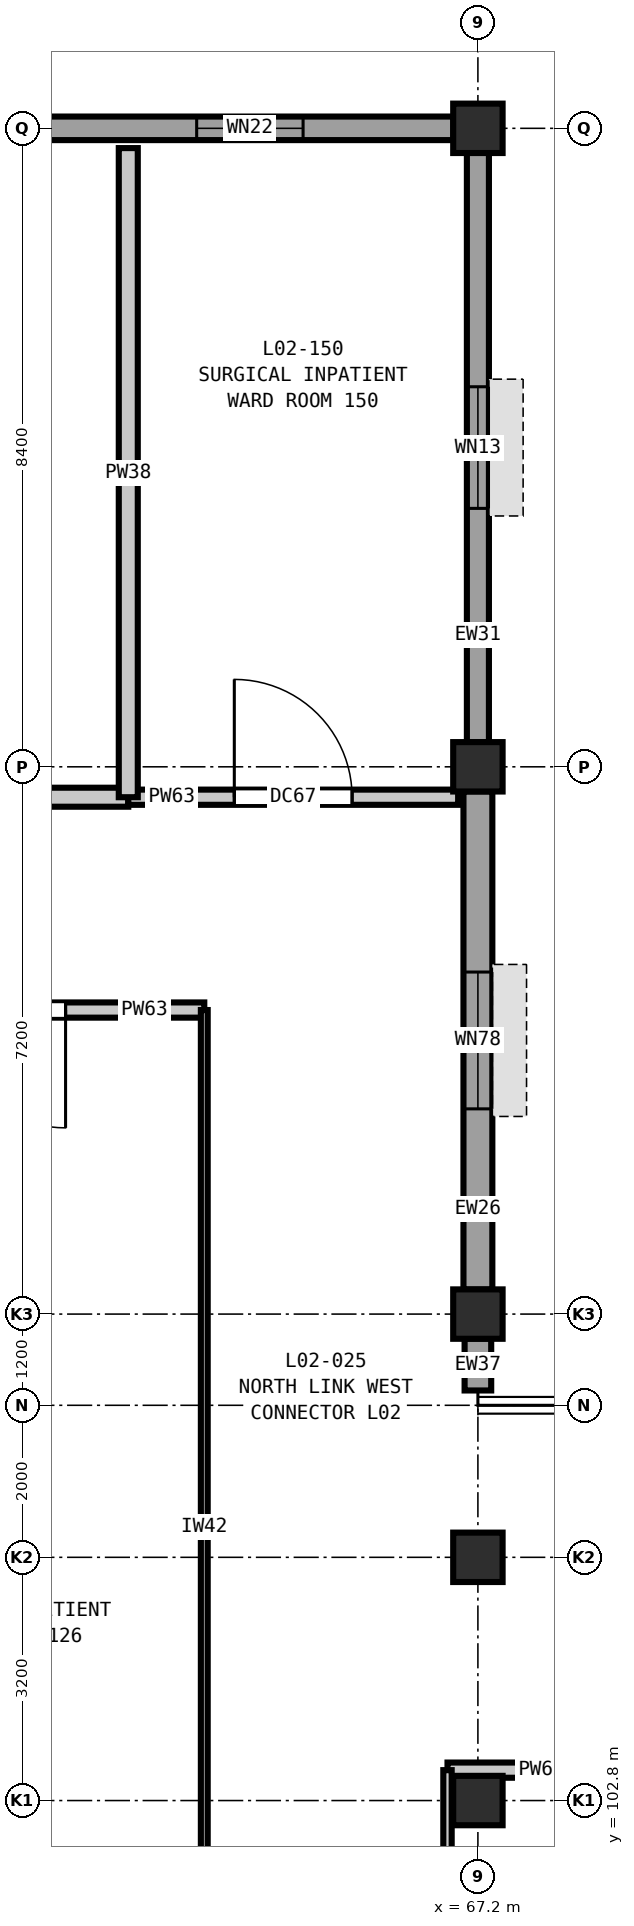
"""IFC4 building model, lengths in metres.
Left out: names, types, materials, properties, quantities, classifications, styles, units other than length and angle.
Written with IfcOpenShell. Run it as: python <this file> out.ifc"""

import sys

from ifc_helpers import new_model, si_unit, direction, frame, frame_2d, origin, origin_2d, place, context, subcontext, project, spatial, rectangle, extrude, element, fill, save


model = new_model("IFC4")
c1 = context("Model", 3, precision=1e-05, world=origin(), true_north=direction((0.0, 1.0)))
c2 = subcontext(c1, "Body", "Model", "MODEL_VIEW")
j1 = project(units=[si_unit("LENGTHUNIT", "METRE"), si_unit("PLANEANGLEUNIT", "RADIAN")], contexts=[c1])
p1 = place(None, origin())
s1 = spatial("IfcSite", under=j1, at=p1, CompositionType="ELEMENT")
p2 = place(p1, origin())
s2 = spatial("IfcBuilding", under=s1, at=p2, CompositionType="ELEMENT")
p3 = place(p2, frame((0.0, 0.0, 10.8)))
s3 = spatial("IfcBuildingStorey", under=s2, at=p3, CompositionType="ELEMENT", Elevation=10.8)
for number, where, z_axis, x_axis in (
    (1, (67.2, 102.8, 0.0), (0.0, 0.0, 1.0), (1.0, 0.0, 0.0)),
    (2, (67.2, 106.0, 0.0), (0.0, 0.0, 1.0), (1.0, 0.0, 0.0)),
    (3, (67.2, 109.2, 0.0), (0.0, 0.0, 1.0), (1.0, 0.0, 0.0)),
    (4, (67.2, 116.4, 0.0), (0.0, 0.0, 1.0), (1.0, 0.0, 0.0)),
    (5, (67.2, 124.8, 0.0), (0.0, 0.0, 1.0), (1.0, 0.0, 0.0)),
):
    element("IfcColumn", number, at=place(p3, frame(where, z_axis=z_axis, x_axis=x_axis)), inside=s3, PredefinedType="COLUMN", context=c2, shape_type="SweptSolid", body=[
        extrude(rectangle(XDim=0.65, YDim=0.65, at=origin_2d()), origin(), (0.0, 0.0, 1.0), 5.4),
    ])
p4 = place(p3, frame((59.123, 124.8, 0.0), z_axis=(0.0, 0.0, 1.0), x_axis=(1.0, 0.0, 0.0)))
e6 = element("IfcWall", 6, at=p4, inside=s3, PredefinedType="SOLIDWALL", context=c2, shape_type="SweptSolid", body=[
    extrude(rectangle(XDim=7.754, YDim=0.31, at=frame_2d((3.877, 0.0))), origin(), (0.0, 0.0, 1.0), 4.68),
])
p5 = place(p4, frame((4.377, 0.0, 0.9)))
e7 = element("IfcOpeningElement", 7, at=p5, cuts=e6, PredefinedType="OPENING", context=c2, shape_type="SweptSolid", body=[
    extrude(rectangle(XDim=1.4, YDim=1.95, at=frame_2d((0.7, 0.975))), frame((0.0, 0.165, 0.0), z_axis=(0.0, -1.0, 0.0), x_axis=(1.0, 0.0, 0.0)), (0.0, 0.0, 1.0), 0.33),
])
p6 = place(p3, frame((67.2, 124.477, 0.0), z_axis=(0.0, 0.0, 1.0), x_axis=(0.0, -1.0, 0.0)))
e8 = element("IfcWall", 8, at=p6, inside=s3, PredefinedType="SOLIDWALL", context=c2, shape_type="SweptSolid", body=[
    extrude(rectangle(XDim=7.754, YDim=0.29, at=frame_2d((3.877, 0.0))), origin(), (0.0, 0.0, 1.0), 4.68),
])
p7 = place(p6, frame((3.077, 0.0, 0.9)))
e9 = element("IfcOpeningElement", 9, at=p7, cuts=e8, PredefinedType="OPENING", context=c2, shape_type="SweptSolid", body=[
    extrude(rectangle(XDim=1.6, YDim=1.95, at=frame_2d((0.8, 0.975))), frame((0.0, 0.155, 0.0), z_axis=(0.0, -1.0, 0.0), x_axis=(1.0, 0.0, 0.0)), (0.0, 0.0, 1.0), 0.31),
])
p8 = place(p3, frame((67.2, 116.077, 0.0), z_axis=(0.0, 0.0, 1.0), x_axis=(0.0, -1.0, 0.0)))
e10 = element("IfcWall", 10, at=p8, inside=s3, PredefinedType="SOLIDWALL", context=c2, shape_type="SweptSolid", body=[
    extrude(rectangle(XDim=6.554, YDim=0.38, at=frame_2d((3.277, 0.0))), origin(), (0.0, 0.0, 1.0), 4.68),
])
p9 = place(p8, frame((2.377, 0.0, 0.9)))
e11 = element("IfcOpeningElement", 11, at=p9, cuts=e10, PredefinedType="OPENING", context=c2, shape_type="SweptSolid", body=[
    extrude(rectangle(XDim=1.8, YDim=1.95, at=frame_2d((0.9, 0.975))), frame((0.0, 0.2, 0.0), z_axis=(0.0, -1.0, 0.0), x_axis=(1.0, 0.0, 0.0)), (0.0, 0.0, 1.0), 0.4),
])
p10 = place(p3, frame((67.2, 108.877, 0.0), z_axis=(0.0, 0.0, 1.0), x_axis=(0.0, -1.0, 0.0)))
e12 = element("IfcWall", 12, at=p10, inside=s3, PredefinedType="SOLIDWALL", context=c2, shape_type="SweptSolid", body=[
    extrude(rectangle(XDim=0.682, YDim=0.35, at=frame_2d((0.341, 0.0))), origin(), (0.0, 0.0, 1.0), 4.68),
])
p11 = place(p3, frame((66.8, 103.2, 0.0), z_axis=(0.0, 0.0, 1.0), x_axis=(1.0, 0.0, 0.0)))
e13 = element("IfcWall", 13, at=p11, inside=s3, PredefinedType="PARTITIONING", context=c2, shape_type="SweptSolid", body=[
    extrude(rectangle(XDim=6.8, YDim=0.2, at=frame_2d((3.4, 0.0))), origin(), (0.0, 0.0, 1.0), 5.07),
])
p12 = place(p11, frame((2.725, 0.0, 0.0)))
e14 = element("IfcOpeningElement", 14, at=p12, cuts=e13, PredefinedType="OPENING", context=c2, shape_type="SweptSolid", body=[
    extrude(rectangle(XDim=1.35, YDim=2.2, at=frame_2d((0.675, 1.1))), frame((0.0, 0.11, 0.0), z_axis=(0.0, -1.0, 0.0), x_axis=(1.0, 0.0, 0.0)), (0.0, 0.0, 1.0), 0.22),
])
p13 = place(p3, frame((58.4, 113.2, 0.0), z_axis=(0.0, 0.0, 1.0), x_axis=(1.0, 0.0, 0.0)))
e15 = element("IfcWall", 15, at=p13, inside=s3, PredefinedType="PARTITIONING", context=c2, shape_type="SweptSolid", body=[
    extrude(rectangle(XDim=5.2, YDim=0.2, at=frame_2d((2.6, 0.0))), origin(), (0.0, 0.0, 1.0), 5.07),
])
p14 = place(p13, frame((1.825, 0.0, 0.0)))
e16 = element("IfcOpeningElement", 16, at=p14, cuts=e15, PredefinedType="OPENING", context=c2, shape_type="SweptSolid", body=[
    extrude(rectangle(XDim=1.55, YDim=2.25, at=frame_2d((0.775, 1.125))), frame((0.0, 0.11, 0.0), z_axis=(0.0, -1.0, 0.0), x_axis=(1.0, 0.0, 0.0)), (0.0, 0.0, 1.0), 0.22),
])
p15 = place(p3, frame((57.2, 116.0, 0.0), z_axis=(0.0, 0.0, 1.0), x_axis=(1.0, 0.0, 0.0)))
e17 = element("IfcWall", 17, at=p15, inside=s3, PredefinedType="PARTITIONING", context=c2, shape_type="SweptSolid", body=[
    extrude(rectangle(XDim=5.4, YDim=0.25, at=frame_2d((2.7, 0.0))), origin(), (0.0, 0.0, 1.0), 5.07),
])
p16 = place(p15, frame((2.6, 0.0, 0.0)))
e18 = element("IfcOpeningElement", 18, at=p16, cuts=e17, PredefinedType="OPENING", context=c2, shape_type="SweptSolid", body=[
    extrude(rectangle(XDim=1.45, YDim=2.25, at=frame_2d((0.725, 1.125))), frame((0.0, 0.135, 0.0), z_axis=(0.0, -1.0, 0.0), x_axis=(1.0, 0.0, 0.0)), (0.0, 0.0, 1.0), 0.27),
])
p17 = place(p3, frame((62.6, 116.0, 0.0), z_axis=(0.0, 0.0, 1.0), x_axis=(1.0, 0.0, 0.0)))
e19 = element("IfcWall", 19, at=p17, inside=s3, PredefinedType="PARTITIONING", context=c2, shape_type="SweptSolid", body=[
    extrude(rectangle(XDim=4.34, YDim=0.2, at=frame_2d((2.17, 0.0))), origin(), (0.0, 0.0, 1.0), 5.07),
])
p18 = place(p17, frame((1.395, 0.0, 0.0)))
e20 = element("IfcOpeningElement", 20, at=p18, cuts=e19, PredefinedType="OPENING", context=c2, shape_type="SweptSolid", body=[
    extrude(rectangle(XDim=1.55, YDim=2.25, at=frame_2d((0.775, 1.125))), frame((0.0, 0.11, 0.0), z_axis=(0.0, -1.0, 0.0), x_axis=(1.0, 0.0, 0.0)), (0.0, 0.0, 1.0), 0.22),
])
p19 = place(p3, frame((62.6, 116.0, 0.0), z_axis=(0.0, 0.0, 1.0), x_axis=(0.0, 1.0, 0.0)))
e21 = element("IfcWall", 21, at=p19, inside=s3, PredefinedType="PARTITIONING", context=c2, shape_type="SweptSolid", body=[
    extrude(rectangle(XDim=8.54, YDim=0.25, at=frame_2d((4.27, 0.0))), origin(), (0.0, 0.0, 1.0), 5.07),
])
p20 = place(p3, frame((63.6, 99.6, 0.0), z_axis=(0.0, 0.0, 1.0), x_axis=(0.0, 1.0, 0.0)))
e22 = element("IfcWall", 22, at=p20, inside=s3, PredefinedType="PARTITIONING", context=c2, shape_type="SweptSolid", body=[
    extrude(rectangle(XDim=13.6, YDim=0.09, at=frame_2d((6.8, 0.0))), origin(), (0.0, 0.0, 1.0), 5.07),
])
p21 = place(p3, frame((66.8, 99.6, 0.0), z_axis=(0.0, 0.0, 1.0), x_axis=(0.0, 1.0, 0.0)))
e23 = element("IfcWall", 23, at=p21, inside=s3, PredefinedType="PARTITIONING", context=c2, shape_type="SweptSolid", body=[
    extrude(rectangle(XDim=3.6, YDim=0.11, at=frame_2d((1.8, 0.0))), origin(), (0.0, 0.0, 1.0), 5.07),
])
p22 = place(p5, origin())
e24 = element("IfcWindow", 24, at=p22, inside=s3, PartitioningType="SINGLE_PANEL", PredefinedType="WINDOW", context=c2, shape_type="SweptSolid", body=[
    extrude(rectangle(XDim=1.4, YDim=1.95, at=frame_2d((0.7, 0.975))), frame((0.0, 0.03, 0.0), z_axis=(0.0, -1.0, 0.0), x_axis=(1.0, 0.0, 0.0)), (0.0, 0.0, 1.0), 0.06),
])
fill(e7, e24)
p23 = place(p7, origin())
e25 = element("IfcWindow", 25, at=p23, inside=s3, PartitioningType="DOUBLE_PANEL_VERTICAL", PredefinedType="WINDOW", context=c2, shape_type="SweptSolid", body=[
    extrude(rectangle(XDim=1.6, YDim=1.95, at=frame_2d((0.8, 0.975))), frame((0.0, 0.03, 0.0), z_axis=(0.0, -1.0, 0.0), x_axis=(1.0, 0.0, 0.0)), (0.0, 0.0, 1.0), 0.06),
])
fill(e9, e25)
p24 = place(p9, origin())
e26 = element("IfcWindow", 26, at=p24, inside=s3, PartitioningType="DOUBLE_PANEL_VERTICAL", PredefinedType="WINDOW", context=c2, shape_type="SweptSolid", body=[
    extrude(rectangle(XDim=1.8, YDim=1.95, at=frame_2d((0.9, 0.975))), frame((0.0, 0.03, 0.0), z_axis=(0.0, -1.0, 0.0), x_axis=(1.0, 0.0, 0.0)), (0.0, 0.0, 1.0), 0.06),
])
fill(e11, e26)
p25 = place(p14, frame((1.55, 0.0, 0.0), z_axis=(0.0, 0.0, 1.0), x_axis=(-1.0, 0.0, 0.0)))
e27 = element("IfcDoor", 27, at=p25, inside=s3, OperationType="SINGLE_SWING_LEFT", PredefinedType="DOOR", context=c2, shape_type="SweptSolid", body=[
    extrude(rectangle(XDim=1.55, YDim=2.25, at=frame_2d((0.775, 1.125))), frame((0.0, 0.025, 0.0), z_axis=(0.0, -1.0, 0.0), x_axis=(1.0, 0.0, 0.0)), (0.0, 0.0, 1.0), 0.05),
])
fill(e16, e27)
p26 = place(p18, origin())
e28 = element("IfcDoor", 28, at=p26, inside=s3, OperationType="SINGLE_SWING_LEFT", PredefinedType="DOOR", context=c2, shape_type="SweptSolid", body=[
    extrude(rectangle(XDim=1.55, YDim=2.25, at=frame_2d((0.775, 1.125))), frame((0.0, 0.025, 0.0), z_axis=(0.0, -1.0, 0.0), x_axis=(1.0, 0.0, 0.0)), (0.0, 0.0, 1.0), 0.05),
])
fill(e20, e28)
save(model, sys.argv[1])
